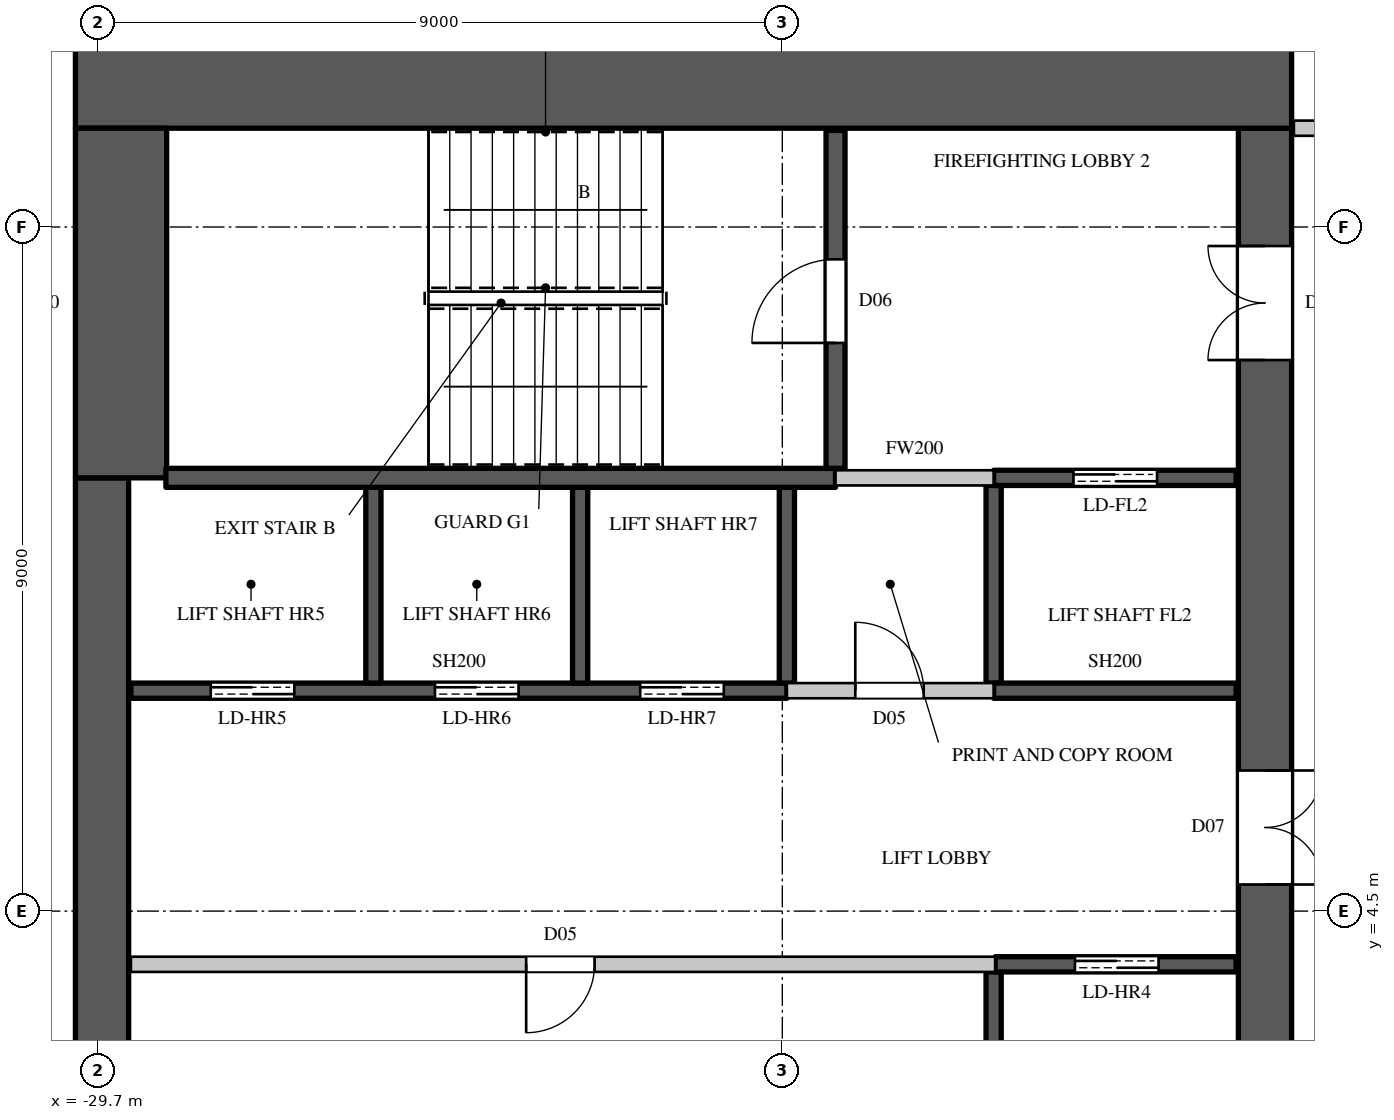
"""IFC4 building model, lengths in metres.
Left out: names, types, materials, properties, quantities, classifications, styles, units other than length and angle.
Written with IfcOpenShell. Run it as: python <this file> out.ifc"""

import sys

from ifc_helpers import new_model, si_unit, direction, frame, frame_2d, origin, place, context, subcontext, project, spatial, rectangle, extrude, element, fill, save


model = new_model("IFC4")
c1 = context("Model", 3, precision=1e-05, world=origin(), true_north=direction((0.0, 1.0)))
c2 = subcontext(c1, "Body", "Model", "MODEL_VIEW")
j1 = project(units=[si_unit("LENGTHUNIT", "METRE"), si_unit("PLANEANGLEUNIT", "RADIAN")], contexts=[c1])
p1 = place(None, origin())
s1 = spatial("IfcSite", under=j1, at=p1, CompositionType="ELEMENT")
p2 = place(p1, origin())
s2 = spatial("IfcBuilding", under=s1, at=p2, CompositionType="ELEMENT")
p3 = place(p2, frame((0.0, 0.0, 280.3)))
s3 = spatial("IfcBuildingStorey", under=s2, at=p3, CompositionType="ELEMENT", Elevation=280.3)
p4 = place(p3, frame((-30.0, 15.4, 0.0), z_axis=(0.0, 0.0, 1.0), x_axis=(1.0, 0.0, 0.0)))
e1 = element("IfcWall", 1, at=p4, inside=s3, PredefinedType="SHEAR", context=c2, shape_type="SweptSolid", body=[
    extrude(rectangle(XDim=16.0, YDim=1.2, at=frame_2d((8.0, 0.0))), origin(), (0.0, 0.0, 1.0), 4.1),
])
p5 = place(p3, frame((-14.35, -14.8, 0.0), z_axis=(0.0, 0.0, 1.0), x_axis=(0.0, 1.0, 0.0)))
e2 = element("IfcWall", 2, at=p5, inside=s3, PredefinedType="SHEAR", context=c2, shape_type="SweptSolid", body=[
    extrude(rectangle(XDim=29.6, YDim=0.7, at=frame_2d((14.8, 0.0))), origin(), (0.0, 0.0, 1.0), 4.1),
])
p6 = place(p5, frame((1.55, 0.0, 0.0)))
e3 = element("IfcOpeningElement", 3, at=p6, cuts=e2, PredefinedType="OPENING", context=c2, shape_type="SweptSolid", body=[
    extrude(rectangle(XDim=1.5, YDim=2.4, at=frame_2d((0.75, 1.2))), frame((0.0, 0.36, 0.0), z_axis=(0.0, -1.0, 0.0), x_axis=(1.0, 0.0, 0.0)), (0.0, 0.0, 1.0), 0.72),
])
p7 = place(p5, frame((26.55, 0.0, 0.0)))
e4 = element("IfcOpeningElement", 4, at=p7, cuts=e2, PredefinedType="OPENING", context=c2, shape_type="SweptSolid", body=[
    extrude(rectangle(XDim=1.5, YDim=2.4, at=frame_2d((0.75, 1.2))), frame((0.0, 0.36, 0.0), z_axis=(0.0, -1.0, 0.0), x_axis=(1.0, 0.0, 0.0)), (0.0, 0.0, 1.0), 0.72),
])
p8 = place(p5, frame((8.45, 0.0, 0.0)))
e5 = element("IfcOpeningElement", 5, at=p8, cuts=e2, PredefinedType="OPENING", context=c2, shape_type="SweptSolid", body=[
    extrude(rectangle(XDim=1.5, YDim=2.4, at=frame_2d((0.75, 1.2))), frame((0.0, 0.36, 0.0), z_axis=(0.0, -1.0, 0.0), x_axis=(1.0, 0.0, 0.0)), (0.0, 0.0, 1.0), 0.72),
])
p9 = place(p5, frame((19.65, 0.0, 0.0)))
e6 = element("IfcOpeningElement", 6, at=p9, cuts=e2, PredefinedType="OPENING", context=c2, shape_type="SweptSolid", body=[
    extrude(rectangle(XDim=1.5, YDim=2.4, at=frame_2d((0.75, 1.2))), frame((0.0, 0.36, 0.0), z_axis=(0.0, -1.0, 0.0), x_axis=(1.0, 0.0, 0.0)), (0.0, 0.0, 1.0), 0.72),
])
p10 = place(p5, frame((14.5, 0.0, 0.0)))
e7 = element("IfcOpeningElement", 7, at=p10, cuts=e2, PredefinedType="OPENING", context=c2, shape_type="SweptSolid", body=[
    extrude(rectangle(XDim=0.6, YDim=2.0, at=frame_2d((0.3, 1.0))), frame((0.0, 0.36, 0.0), z_axis=(0.0, -1.0, 0.0), x_axis=(1.0, 0.0, 0.0)), (0.0, 0.0, 1.0), 0.72),
])
p11 = place(p3, frame((-29.65, -10.2, 0.0), z_axis=(0.0, 0.0, 1.0), x_axis=(0.0, 1.0, 0.0)))
e8 = element("IfcWall", 8, at=p11, inside=s3, PredefinedType="SHEAR", context=c2, shape_type="SweptSolid", body=[
    extrude(rectangle(XDim=20.4, YDim=0.7, at=frame_2d((10.2, 0.0))), origin(), (0.0, 0.0, 1.0), 4.1),
])
p12 = place(p3, frame((-29.4, 10.2, 0.0), z_axis=(0.0, 0.0, 1.0), x_axis=(0.0, 1.0, 0.0)))
e9 = element("IfcWall", 9, at=p12, inside=s3, PredefinedType="SHEAR", context=c2, shape_type="SweptSolid", body=[
    extrude(rectangle(XDim=4.6, YDim=1.2, at=frame_2d((2.3, 0.0))), origin(), (0.0, 0.0, 1.0), 4.1),
])
p13 = place(p3, frame((-20.64, 7.4, 0.0), z_axis=(0.0, 0.0, 1.0), x_axis=(1.0, 0.0, 0.0)))
e10 = element("IfcWall", 10, at=p13, inside=s3, PredefinedType="PARTITIONING", context=c2, shape_type="SweptSolid", body=[
    extrude(rectangle(XDim=2.72, YDim=0.2, at=frame_2d((1.36, 0.0))), origin(), (0.0, 0.0, 1.0), 3.8),
])
p14 = place(p13, frame((0.9, 0.0, 0.0)))
e11 = element("IfcOpeningElement", 11, at=p14, cuts=e10, PredefinedType="OPENING", context=c2, shape_type="SweptSolid", body=[
    extrude(rectangle(XDim=0.9, YDim=2.2, at=frame_2d((0.45, 1.1))), frame((0.0, 0.11, 0.0), z_axis=(0.0, -1.0, 0.0), x_axis=(1.0, 0.0, 0.0)), (0.0, 0.0, 1.0), 0.22),
])
p15 = place(p3, frame((-20.0, 10.2, 0.0), z_axis=(0.0, 0.0, 1.0), x_axis=(1.0, 0.0, 0.0)))
e12 = element("IfcWall", 12, at=p15, inside=s3, PredefinedType="PARTITIONING", context=c2, shape_type="SweptSolid", body=[
    extrude(rectangle(XDim=2.08, YDim=0.2, at=frame_2d((1.04, 0.0))), origin(), (0.0, 0.0, 1.0), 3.8),
])
p16 = place(p3, frame((-13.97, 14.8, 0.0), z_axis=(0.0, 0.0, 1.0), x_axis=(1.0, 0.0, 0.0)))
e13 = element("IfcWall", 13, at=p16, inside=s3, PredefinedType="PARTITIONING", context=c2, shape_type="SweptSolid", body=[
    extrude(rectangle(XDim=2.87, YDim=0.2, at=frame_2d((1.435, 0.0))), origin(), (0.0, 0.0, 1.0), 3.8),
])
p17 = place(p3, frame((-29.27, 3.8, 0.0), z_axis=(0.0, 0.0, 1.0), x_axis=(1.0, 0.0, 0.0)))
e14 = element("IfcWall", 14, at=p17, inside=s3, PredefinedType="PARTITIONING", context=c2, shape_type="SweptSolid", body=[
    extrude(rectangle(XDim=11.37, YDim=0.2, at=frame_2d((5.685, 0.0))), origin(), (0.0, 0.0, 1.0), 3.8),
])
p18 = place(p17, frame((5.2, 0.0, 0.0)))
e15 = element("IfcOpeningElement", 15, at=p18, cuts=e14, PredefinedType="OPENING", context=c2, shape_type="SweptSolid", body=[
    extrude(rectangle(XDim=0.9, YDim=2.2, at=frame_2d((0.45, 1.1))), frame((0.0, 0.11, 0.0), z_axis=(0.0, -1.0, 0.0), x_axis=(1.0, 0.0, 0.0)), (0.0, 0.0, 1.0), 0.22),
])
p19 = place(p3, frame((-29.27, 7.4, 0.0), z_axis=(0.0, 0.0, 1.0), x_axis=(1.0, 0.0, 0.0)))
e16 = element("IfcWall", 16, at=p19, inside=s3, PredefinedType="SHEAR", context=c2, shape_type="SweptSolid", body=[
    extrude(rectangle(XDim=8.63, YDim=0.2, at=frame_2d((4.315, 0.0))), origin(), (0.0, 0.0, 1.0), 3.8),
])
p20 = place(p19, frame((1.05, 0.0, 0.0)))
e17 = element("IfcOpeningElement", 17, at=p20, cuts=e16, PredefinedType="OPENING", context=c2, shape_type="SweptSolid", body=[
    extrude(rectangle(XDim=1.1, YDim=2.2, at=frame_2d((0.55, 1.1))), frame((0.0, 0.11, 0.0), z_axis=(0.0, -1.0, 0.0), x_axis=(1.0, 0.0, 0.0)), (0.0, 0.0, 1.0), 0.22),
])
p21 = place(p19, frame((4.0, 0.0, 0.0)))
e18 = element("IfcOpeningElement", 18, at=p21, cuts=e16, PredefinedType="OPENING", context=c2, shape_type="SweptSolid", body=[
    extrude(rectangle(XDim=1.1, YDim=2.2, at=frame_2d((0.55, 1.1))), frame((0.0, 0.11, 0.0), z_axis=(0.0, -1.0, 0.0), x_axis=(1.0, 0.0, 0.0)), (0.0, 0.0, 1.0), 0.22),
])
p22 = place(p19, frame((6.7, 0.0, 0.0)))
e19 = element("IfcOpeningElement", 19, at=p22, cuts=e16, PredefinedType="OPENING", context=c2, shape_type="SweptSolid", body=[
    extrude(rectangle(XDim=1.1, YDim=2.2, at=frame_2d((0.55, 1.1))), frame((0.0, 0.11, 0.0), z_axis=(0.0, -1.0, 0.0), x_axis=(1.0, 0.0, 0.0)), (0.0, 0.0, 1.0), 0.22),
])
for number, where, z_axis, x_axis in (
    (20, (-26.08, 7.5, 0.0), (0.0, 0.0, 1.0), (0.0, 1.0, 0.0)),
    (21, (-23.36, 7.5, 0.0), (0.0, 0.0, 1.0), (0.0, 1.0, 0.0)),
):
    element("IfcWall", number, at=place(p3, frame(where, z_axis=z_axis, x_axis=x_axis)), inside=s3, PredefinedType="SHEAR", context=c2, shape_type="SweptSolid", body=[
        extrude(rectangle(XDim=2.575, YDim=0.2, at=frame_2d((1.288, 0.0))), origin(), (0.0, 0.0, 1.0), 4.1),
    ])
p23 = place(p3, frame((-20.64, 7.5, 0.0), z_axis=(0.0, 0.0, 1.0), x_axis=(0.0, 1.0, 0.0)))
e22 = element("IfcWall", 22, at=p23, inside=s3, PredefinedType="SHEAR", context=c2, shape_type="SweptSolid", body=[
    extrude(rectangle(XDim=2.575, YDim=0.2, at=frame_2d((1.288, 0.0))), origin(), (0.0, 0.0, 1.0), 3.8),
])
p24 = place(p3, frame((-17.92, 1.1, 0.0), z_axis=(0.0, 0.0, 1.0), x_axis=(0.0, 1.0, 0.0)))
e23 = element("IfcWall", 23, at=p24, inside=s3, PredefinedType="SHEAR", context=c2, shape_type="SweptSolid", body=[
    extrude(rectangle(XDim=2.6, YDim=0.2, at=frame_2d((1.3, 0.0))), origin(), (0.0, 0.0, 1.0), 3.8),
])
p25 = place(p3, frame((-17.9, 3.8, 0.0), z_axis=(0.0, 0.0, 1.0), x_axis=(1.0, 0.0, 0.0)))
e24 = element("IfcWall", 24, at=p25, inside=s3, PredefinedType="SHEAR", context=c2, shape_type="SweptSolid", body=[
    extrude(rectangle(XDim=3.17, YDim=0.2, at=frame_2d((1.585, 0.0))), origin(), (0.0, 0.0, 1.0), 3.8),
])
p26 = place(p25, frame((1.05, 0.0, 0.0)))
e25 = element("IfcOpeningElement", 25, at=p26, cuts=e24, PredefinedType="OPENING", context=c2, shape_type="SweptSolid", body=[
    extrude(rectangle(XDim=1.1, YDim=2.2, at=frame_2d((0.55, 1.1))), frame((0.0, 0.11, 0.0), z_axis=(0.0, -1.0, 0.0), x_axis=(1.0, 0.0, 0.0)), (0.0, 0.0, 1.0), 0.22),
])
p27 = place(p3, frame((-17.92, 7.5, 0.0), z_axis=(0.0, 0.0, 1.0), x_axis=(0.0, 1.0, 0.0)))
e26 = element("IfcWall", 26, at=p27, inside=s3, PredefinedType="SHEAR", context=c2, shape_type="SweptSolid", body=[
    extrude(rectangle(XDim=2.6, YDim=0.2, at=frame_2d((1.3, 0.0))), origin(), (0.0, 0.0, 1.0), 3.8),
])
p28 = place(p3, frame((-17.92, 7.4, 0.0), z_axis=(0.0, 0.0, 1.0), x_axis=(1.0, 0.0, 0.0)))
e27 = element("IfcWall", 27, at=p28, inside=s3, PredefinedType="SHEAR", context=c2, shape_type="SweptSolid", body=[
    extrude(rectangle(XDim=3.19, YDim=0.2, at=frame_2d((1.595, 0.0))), origin(), (0.0, 0.0, 1.0), 3.8),
])
p29 = place(p3, frame((-17.92, 10.2, 0.0), z_axis=(0.0, 0.0, 1.0), x_axis=(1.0, 0.0, 0.0)))
e28 = element("IfcWall", 28, at=p29, inside=s3, PredefinedType="SHEAR", context=c2, shape_type="SweptSolid", body=[
    extrude(rectangle(XDim=3.19, YDim=0.2, at=frame_2d((1.595, 0.0))), origin(), (0.0, 0.0, 1.0), 3.8),
])
p30 = place(p29, frame((1.05, 0.0, 0.0)))
e29 = element("IfcOpeningElement", 29, at=p30, cuts=e28, PredefinedType="OPENING", context=c2, shape_type="SweptSolid", body=[
    extrude(rectangle(XDim=1.1, YDim=2.2, at=frame_2d((0.55, 1.1))), frame((0.0, 0.11, 0.0), z_axis=(0.0, -1.0, 0.0), x_axis=(1.0, 0.0, 0.0)), (0.0, 0.0, 1.0), 0.22),
])
p31 = place(p3, frame((-28.81, 10.2, 0.0), z_axis=(0.0, 0.0, 1.0), x_axis=(1.0, 0.0, 0.0)))
e30 = element("IfcWall", 30, at=p31, inside=s3, PredefinedType="SHEAR", context=c2, shape_type="SweptSolid", body=[
    extrude(rectangle(XDim=8.81, YDim=0.25, at=frame_2d((4.405, 0.0))), origin(), (0.0, 0.0, 1.0), 3.8),
])
p32 = place(p3, frame((-20.0, 10.325, 0.0), z_axis=(0.0, 0.0, 1.0), x_axis=(0.0, 1.0, 0.0)))
e31 = element("IfcWall", 31, at=p32, inside=s3, PredefinedType="SHEAR", context=c2, shape_type="SweptSolid", body=[
    extrude(rectangle(XDim=4.445, YDim=0.25, at=frame_2d((2.223, 0.0))), origin(), (0.0, 0.0, 1.0), 3.8),
])
p33 = place(p32, frame((1.65, 0.0, 0.0)))
e32 = element("IfcOpeningElement", 32, at=p33, cuts=e31, PredefinedType="OPENING", context=c2, shape_type="SweptSolid", body=[
    extrude(rectangle(XDim=1.1, YDim=2.2, at=frame_2d((0.55, 1.1))), frame((0.0, 0.135, 0.0), z_axis=(0.0, -1.0, 0.0), x_axis=(1.0, 0.0, 0.0)), (0.0, 0.0, 1.0), 0.27),
])
p34 = place(p33, origin())
e33 = element("IfcDoor", 33, at=p34, inside=s3, OperationType="SINGLE_SWING_LEFT", PredefinedType="DOOR", context=c2, shape_type="SweptSolid", body=[
    extrude(rectangle(XDim=1.1, YDim=2.2, at=frame_2d((0.55, 1.1))), frame((0.0, 0.025, 0.0), z_axis=(0.0, -1.0, 0.0), x_axis=(1.0, 0.0, 0.0)), (0.0, 0.0, 1.0), 0.05),
])
fill(e32, e33)
p35 = place(p18, origin())
e34 = element("IfcDoor", 34, at=p35, inside=s3, OperationType="SINGLE_SWING_RIGHT", PredefinedType="DOOR", context=c2, shape_type="SweptSolid", body=[
    extrude(rectangle(XDim=0.9, YDim=2.2, at=frame_2d((0.45, 1.1))), frame((0.0, 0.025, 0.0), z_axis=(0.0, -1.0, 0.0), x_axis=(1.0, 0.0, 0.0)), (0.0, 0.0, 1.0), 0.05),
])
fill(e15, e34)
p36 = place(p14, origin())
e35 = element("IfcDoor", 35, at=p36, inside=s3, OperationType="SINGLE_SWING_LEFT", PredefinedType="DOOR", context=c2, shape_type="SweptSolid", body=[
    extrude(rectangle(XDim=0.9, YDim=2.2, at=frame_2d((0.45, 1.1))), frame((0.0, 0.025, 0.0), z_axis=(0.0, -1.0, 0.0), x_axis=(1.0, 0.0, 0.0)), (0.0, 0.0, 1.0), 0.05),
])
fill(e11, e35)
p37 = place(p26, origin())
e36 = element("IfcDoor", 36, at=p37, inside=s3, OperationType="DOUBLE_DOOR_SLIDING", PredefinedType="DOOR", context=c2, shape_type="SweptSolid", body=[
    extrude(rectangle(XDim=1.1, YDim=2.2, at=frame_2d((0.55, 1.1))), frame((0.0, 0.025, 0.0), z_axis=(0.0, -1.0, 0.0), x_axis=(1.0, 0.0, 0.0)), (0.0, 0.0, 1.0), 0.05),
])
fill(e25, e36)
p38 = place(p20, origin())
e37 = element("IfcDoor", 37, at=p38, inside=s3, OperationType="DOUBLE_DOOR_SLIDING", PredefinedType="DOOR", context=c2, shape_type="SweptSolid", body=[
    extrude(rectangle(XDim=1.1, YDim=2.2, at=frame_2d((0.55, 1.1))), frame((0.0, 0.025, 0.0), z_axis=(0.0, -1.0, 0.0), x_axis=(1.0, 0.0, 0.0)), (0.0, 0.0, 1.0), 0.05),
])
fill(e17, e37)
p39 = place(p21, origin())
e38 = element("IfcDoor", 38, at=p39, inside=s3, OperationType="DOUBLE_DOOR_SLIDING", PredefinedType="DOOR", context=c2, shape_type="SweptSolid", body=[
    extrude(rectangle(XDim=1.1, YDim=2.2, at=frame_2d((0.55, 1.1))), frame((0.0, 0.025, 0.0), z_axis=(0.0, -1.0, 0.0), x_axis=(1.0, 0.0, 0.0)), (0.0, 0.0, 1.0), 0.05),
])
fill(e18, e38)
p40 = place(p22, origin())
e39 = element("IfcDoor", 39, at=p40, inside=s3, OperationType="DOUBLE_DOOR_SLIDING", PredefinedType="DOOR", context=c2, shape_type="SweptSolid", body=[
    extrude(rectangle(XDim=1.1, YDim=2.2, at=frame_2d((0.55, 1.1))), frame((0.0, 0.025, 0.0), z_axis=(0.0, -1.0, 0.0), x_axis=(1.0, 0.0, 0.0)), (0.0, 0.0, 1.0), 0.05),
])
fill(e19, e39)
p41 = place(p30, origin())
e40 = element("IfcDoor", 40, at=p41, inside=s3, OperationType="DOUBLE_DOOR_SLIDING", PredefinedType="DOOR", context=c2, shape_type="SweptSolid", body=[
    extrude(rectangle(XDim=1.1, YDim=2.2, at=frame_2d((0.55, 1.1))), frame((0.0, 0.025, 0.0), z_axis=(0.0, -1.0, 0.0), x_axis=(1.0, 0.0, 0.0)), (0.0, 0.0, 1.0), 0.05),
])
fill(e29, e40)
p42 = place(p7, origin())
e41 = element("IfcDoor", 41, at=p42, inside=s3, OperationType="DOUBLE_DOOR_SINGLE_SWING", PredefinedType="DOOR", context=c2, shape_type="SweptSolid", body=[
    extrude(rectangle(XDim=1.5, YDim=2.4, at=frame_2d((0.75, 1.2))), frame((0.0, 0.345, 0.0), z_axis=(0.0, -1.0, 0.0), x_axis=(1.0, 0.0, 0.0)), (0.0, 0.0, 1.0), 0.05),
])
fill(e4, e41)
p43 = place(p9, origin())
e42 = element("IfcDoor", 42, at=p43, inside=s3, OperationType="DOUBLE_DOOR_SINGLE_SWING", PredefinedType="DOOR", context=c2, shape_type="SweptSolid", body=[
    extrude(rectangle(XDim=1.5, YDim=2.4, at=frame_2d((0.75, 1.2))), frame((0.0, -0.295, 0.0), z_axis=(0.0, -1.0, 0.0), x_axis=(1.0, 0.0, 0.0)), (0.0, 0.0, 1.0), 0.05),
])
fill(e6, e42)
save(model, sys.argv[1])
